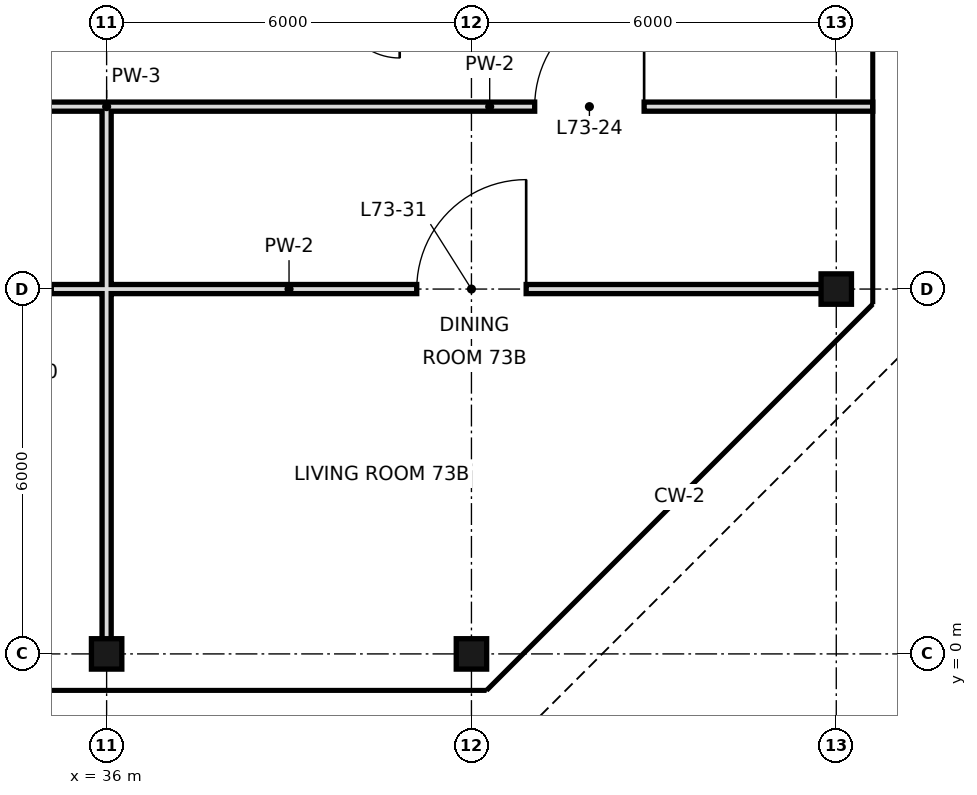
"""IFC4 building model, lengths in metres.
Left out: names, types, materials, properties, quantities, classifications, styles, units other than length and angle.
Written with IfcOpenShell. Run it as: python <this file> out.ifc"""

import sys

from ifc_helpers import new_model, si_unit, direction, frame, frame_2d, origin, origin_2d, place, context, subcontext, project, spatial, rectangle, hollow_rectangle, extrude, element, fill, save


model = new_model("IFC4")
c1 = context("Model", 3, precision=1e-05, world=origin(), true_north=direction((0.0, 1.0)))
c2 = subcontext(c1, "Body", "Model", "MODEL_VIEW")
j1 = project(units=[si_unit("LENGTHUNIT", "METRE"), si_unit("PLANEANGLEUNIT", "RADIAN")], contexts=[c1])
p1 = place(None, origin())
s1 = spatial("IfcSite", under=j1, at=p1, CompositionType="ELEMENT")
p2 = place(p1, origin())
s2 = spatial("IfcBuilding", under=s1, at=p2, CompositionType="ELEMENT")
p3 = place(p2, frame((0.0, 0.0, 308.8)))
s3 = spatial("IfcBuildingStorey", under=s2, at=p3, CompositionType="ELEMENT", Elevation=308.8)
for number, where, z_axis, x_axis in (
    (1, (36.0, 0.0, 0.0), (0.0, 0.0, 1.0), (1.0, 0.0, 0.0)),
    (2, (42.0, 0.0, 0.0), (0.0, 0.0, 1.0), (1.0, 0.0, 0.0)),
    (3, (48.0, 6.0, 0.0), (0.0, 0.0, 1.0), (1.0, 0.0, 0.0)),
):
    element("IfcColumn", number, at=place(p3, frame(where, z_axis=z_axis, x_axis=x_axis)), inside=s3, PredefinedType="COLUMN", context=c2, shape_type="SweptSolid", body=[
        extrude(hollow_rectangle(XDim=0.5, YDim=0.5, WallThickness=0.025, at=origin_2d()), origin(), (0.0, 0.0, 1.0), 3.6),
    ])
p4 = place(p3, frame((36.0, 0.0, 0.0), z_axis=(0.0, 0.0, 1.0), x_axis=(0.0, 1.0, 0.0)))
e4 = element("IfcWall", 4, at=p4, inside=s3, PredefinedType="PARTITIONING", context=c2, shape_type="SweptSolid", body=[
    extrude(rectangle(XDim=6.0, YDim=0.15, at=frame_2d((3.0, 0.0))), origin(), (0.0, 0.0, 1.0), 2.72),
])
p5 = place(p3, frame((36.0, 6.0, 0.0), z_axis=(0.0, 0.0, 1.0), x_axis=(0.0, 1.0, 0.0)))
e5 = element("IfcWall", 5, at=p5, inside=s3, PredefinedType="PARTITIONING", context=c2, shape_type="SweptSolid", body=[
    extrude(rectangle(XDim=3.0, YDim=0.15, at=frame_2d((1.5, 0.0))), origin(), (0.0, 0.0, 1.0), 2.72),
])
p6 = place(p3, frame((36.0, 6.0, 0.0), z_axis=(0.0, 0.0, 1.0), x_axis=(1.0, 0.0, 0.0)))
e6 = element("IfcWall", 6, at=p6, inside=s3, PredefinedType="PARTITIONING", context=c2, shape_type="SweptSolid", body=[
    extrude(rectangle(XDim=12.0, YDim=0.15, at=frame_2d((6.0, 0.0))), origin(), (0.0, 0.0, 1.0), 2.97),
])
p7 = place(p6, frame((5.1, 0.0, 0.0)))
e7 = element("IfcOpeningElement", 7, at=p7, cuts=e6, PredefinedType="OPENING", context=c2, shape_type="SweptSolid", body=[
    extrude(rectangle(XDim=1.8, YDim=2.4, at=frame_2d((0.9, 1.2))), frame((0.0, 0.085, 0.0), z_axis=(0.0, -1.0, 0.0), x_axis=(1.0, 0.0, 0.0)), (0.0, 0.0, 1.0), 0.17),
])
p8 = place(p3, frame((32.4, 6.0, 0.0), z_axis=(0.0, 0.0, 1.0), x_axis=(1.0, 0.0, 0.0)))
e8 = element("IfcWall", 8, at=p8, inside=s3, PredefinedType="PARTITIONING", context=c2, shape_type="SweptSolid", body=[
    extrude(rectangle(XDim=3.6, YDim=0.15, at=frame_2d((1.8, 0.0))), origin(), (0.0, 0.0, 1.0), 2.97),
])
p9 = place(p8, frame((1.79, 0.0, 0.0)))
e9 = element("IfcOpeningElement", 9, at=p9, cuts=e8, PredefinedType="OPENING", context=c2, shape_type="SweptSolid", body=[
    extrude(rectangle(XDim=0.9, YDim=2.4, at=frame_2d((0.45, 1.2))), frame((0.0, 0.085, 0.0), z_axis=(0.0, -1.0, 0.0), x_axis=(1.0, 0.0, 0.0)), (0.0, 0.0, 1.0), 0.17),
])
p10 = place(p3, frame((36.0, 9.0, 0.0), z_axis=(0.0, 0.0, 1.0), x_axis=(1.0, 0.0, 0.0)))
e10 = element("IfcWall", 10, at=p10, inside=s3, PredefinedType="PARTITIONING", context=c2, shape_type="SweptSolid", body=[
    extrude(rectangle(XDim=12.6, YDim=0.15, at=frame_2d((6.3, 0.0))), origin(), (0.0, 0.0, 1.0), 3.42),
])
p11 = place(p10, frame((7.04, 0.0, 0.0)))
e11 = element("IfcOpeningElement", 11, at=p11, cuts=e10, PredefinedType="OPENING", context=c2, shape_type="SweptSolid", body=[
    extrude(rectangle(XDim=1.8, YDim=2.4, at=frame_2d((0.9, 1.2))), frame((0.0, 0.085, 0.0), z_axis=(0.0, -1.0, 0.0), x_axis=(1.0, 0.0, 0.0)), (0.0, 0.0, 1.0), 0.17),
])
p12 = place(p3, frame((32.4, 9.0, 0.0), z_axis=(0.0, 0.0, 1.0), x_axis=(1.0, 0.0, 0.0)))
e12 = element("IfcWall", 12, at=p12, inside=s3, PredefinedType="PARTITIONING", context=c2, shape_type="SweptSolid", body=[
    extrude(rectangle(XDim=3.6, YDim=0.15, at=frame_2d((1.8, 0.0))), origin(), (0.0, 0.0, 1.0), 3.42),
])
p13 = place(p11, frame((1.8, 0.0, 0.0), z_axis=(0.0, 0.0, 1.0), x_axis=(-1.0, 0.0, 0.0)))
e13 = element("IfcDoor", 13, at=p13, inside=s3, OperationType="SINGLE_SWING_LEFT", PredefinedType="DOOR", context=c2, shape_type="SweptSolid", body=[
    extrude(rectangle(XDim=1.8, YDim=2.4, at=frame_2d((0.9, 1.2))), frame((0.0, 0.025, 0.0), z_axis=(0.0, -1.0, 0.0), x_axis=(1.0, 0.0, 0.0)), (0.0, 0.0, 1.0), 0.05),
])
fill(e11, e13)
p14 = place(p7, frame((1.8, 0.0, 0.0), z_axis=(0.0, 0.0, 1.0), x_axis=(-1.0, 0.0, 0.0)))
e14 = element("IfcDoor", 14, at=p14, inside=s3, OperationType="SINGLE_SWING_LEFT", PredefinedType="DOOR", context=c2, shape_type="SweptSolid", body=[
    extrude(rectangle(XDim=1.8, YDim=2.4, at=frame_2d((0.9, 1.2))), frame((0.0, 0.025, 0.0), z_axis=(0.0, -1.0, 0.0), x_axis=(1.0, 0.0, 0.0)), (0.0, 0.0, 1.0), 0.05),
])
fill(e7, e14)
save(model, sys.argv[1])
